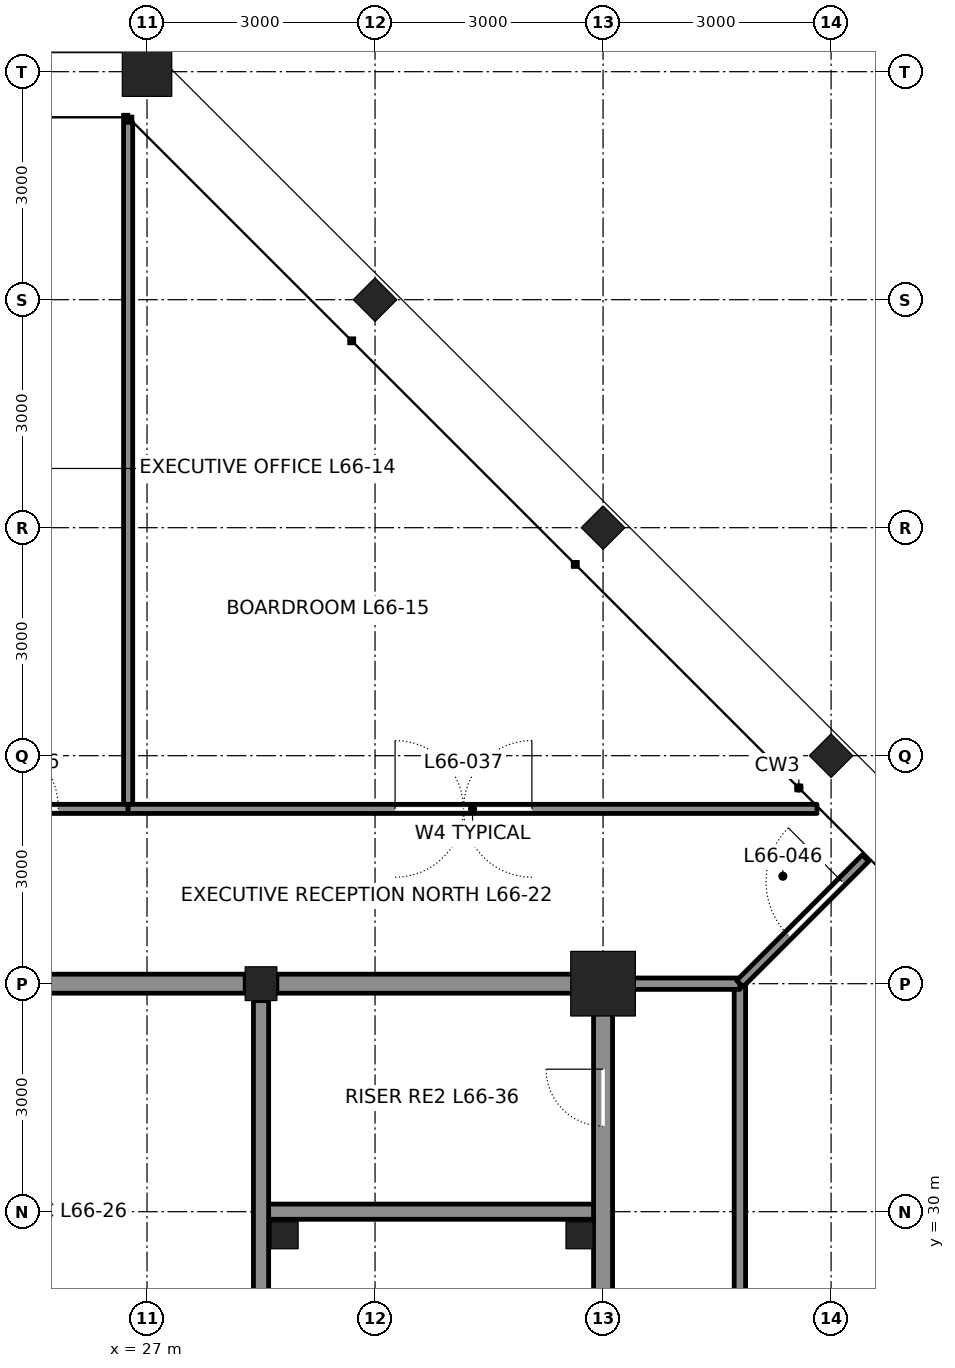
"""IFC4 building model, lengths in metres.
Left out: names, types, materials, properties, quantities, classifications, styles, units other than length and angle.
Written with IfcOpenShell. Run it as: python <this file> out.ifc"""

import sys

from ifc_helpers import new_model, si_unit, direction, frame, frame_2d, origin, origin_2d, place, context, subcontext, project, spatial, rectangle, hollow_rectangle, i_section, extrude, element, fill, save


model = new_model("IFC4")
c1 = context("Model", 3, precision=1e-05, world=origin(), true_north=direction((0.0, 1.0)))
c2 = subcontext(c1, "Body", "Model", "MODEL_VIEW")
j1 = project(units=[si_unit("LENGTHUNIT", "METRE"), si_unit("PLANEANGLEUNIT", "RADIAN")], contexts=[c1])
p1 = place(None, origin())
s1 = spatial("IfcSite", under=j1, at=p1, CompositionType="ELEMENT")
p2 = place(p1, origin())
s2 = spatial("IfcBuilding", under=s1, at=p2, CompositionType="ELEMENT")
p3 = place(p2, frame((0.0, 0.0, 295.8)))
s3 = spatial("IfcBuildingStorey", under=s2, at=p3, CompositionType="ELEMENT", Elevation=295.8)
for number, where, z_axis, x_axis in (
    (1, (36.0, 36.0, 0.0), (0.0, 0.0, 1.0), (0.707, 0.707, 0.0)),
    (2, (33.0, 39.0, 0.0), (0.0, 0.0, 1.0), (0.707, 0.707, 0.0)),
    (3, (30.0, 42.0, 0.0), (0.0, 0.0, 1.0), (0.707, 0.707, 0.0)),
):
    element("IfcColumn", number, at=place(p3, frame(where, z_axis=z_axis, x_axis=x_axis)), inside=s3, PredefinedType="COLUMN", context=c2, shape_type="SweptSolid", body=[
        extrude(i_section(OverallWidth=0.404, OverallDepth=0.406, WebThickness=0.027, FlangeThickness=0.044, at=origin_2d()), origin(), (0.0, 0.0, 1.0), 4.2),
    ])
p4 = place(p3, frame((27.0, 45.0, 0.0), z_axis=(0.0, 0.0, 1.0), x_axis=(0.0, 1.0, 0.0)))
e4 = element("IfcColumn", 4, at=p4, inside=s3, PredefinedType="COLUMN", context=c2, shape_type="SweptSolid", body=[
    extrude(hollow_rectangle(XDim=0.65, YDim=0.65, WallThickness=0.065, at=origin_2d()), origin(), (0.0, 0.0, 1.0), 4.2),
])
p5 = place(p3, frame((28.5, 33.0, 0.0), z_axis=(0.0, 0.0, 1.0), x_axis=(1.0, 0.0, 0.0)))
e5 = element("IfcColumn", 5, at=p5, inside=s3, PredefinedType="COLUMN", context=c2, shape_type="SweptSolid", body=[
    extrude(i_section(OverallWidth=0.417, OverallDepth=0.445, WebThickness=0.039, FlangeThickness=0.063, at=origin_2d()), origin(), (0.0, 0.0, 1.0), 4.2),
])
p6 = place(p3, frame((33.0, 33.0, 0.0), z_axis=(0.0, 0.0, 1.0), x_axis=(1.0, 0.0, 0.0)))
e6 = element("IfcColumn", 6, at=p6, inside=s3, PredefinedType="COLUMN", context=c2, shape_type="SweptSolid", body=[
    extrude(hollow_rectangle(XDim=0.85, YDim=0.85, WallThickness=0.085, at=origin_2d()), origin(), (0.0, 0.0, 1.0), 4.2),
])
p7 = place(p3, frame((28.5, 30.0, 0.0), z_axis=(0.0, 0.0, 1.0), x_axis=(1.0, 0.0, 0.0)))
e7 = element("IfcWall", 7, at=p7, inside=s3, PredefinedType="SOLIDWALL", context=c2, shape_type="SweptSolid", body=[
    extrude(rectangle(XDim=4.5, YDim=0.2, at=frame_2d((2.25, 0.0))), origin(), (0.0, 0.0, 1.0), 4.04),
])
p8 = place(p3, frame((25.708, 33.0, 0.0), z_axis=(0.0, 0.0, 1.0), x_axis=(1.0, 0.0, 0.0)))
e8 = element("IfcWall", 8, at=p8, inside=s3, PredefinedType="SOLIDWALL", context=c2, shape_type="SweptSolid", body=[
    extrude(rectangle(XDim=2.583, YDim=0.25, at=frame_2d((1.292, 0.0))), origin(), (0.0, 0.0, 1.0), 3.181),
])
p9 = place(p3, frame((28.708, 33.0, 0.0), z_axis=(0.0, 0.0, 1.0), x_axis=(1.0, 0.0, 0.0)))
e9 = element("IfcWall", 9, at=p9, inside=s3, PredefinedType="SOLIDWALL", context=c2, shape_type="SweptSolid", body=[
    extrude(rectangle(XDim=4.042, YDim=0.25, at=frame_2d((2.021, 0.0))), origin(), (0.0, 0.0, 1.0), 3.181),
])
p10 = place(p3, frame((28.5, 24.222, 0.0), z_axis=(0.0, 0.0, 1.0), x_axis=(0.0, 1.0, 0.0)))
e10 = element("IfcWall", 10, at=p10, inside=s3, PredefinedType="SOLIDWALL", context=c2, shape_type="SweptSolid", body=[
    extrude(rectangle(XDim=8.555, YDim=0.2, at=frame_2d((4.278, 0.0))), origin(), (0.0, 0.0, 1.0), 3.113),
])
p11 = place(p3, frame((33.0, 24.222, 0.0), z_axis=(0.0, 0.0, 1.0), x_axis=(0.0, 1.0, 0.0)))
e11 = element("IfcWall", 11, at=p11, inside=s3, PredefinedType="SOLIDWALL", context=c2, shape_type="SweptSolid", body=[
    extrude(rectangle(XDim=8.528, YDim=0.25, at=frame_2d((4.264, 0.0))), origin(), (0.0, 0.0, 1.0), 3.113),
])
p12 = place(p11, frame((6.903, 0.0, 0.0)))
e12 = element("IfcOpeningElement", 12, at=p12, cuts=e11, PredefinedType="OPENING", context=c2, shape_type="SweptSolid", body=[
    extrude(rectangle(XDim=0.75, YDim=2.1, at=frame_2d((0.375, 1.05))), frame((0.0, 0.135, 0.0), z_axis=(0.0, -1.0, 0.0), x_axis=(1.0, 0.0, 0.0)), (0.0, 0.0, 1.0), 0.27),
])
p13 = place(p3, frame((26.751, 44.334, 0.0), z_axis=(0.0, 0.0, 1.0), x_axis=(0.0, -1.0, 0.0)))
e13 = element("IfcWall", 13, at=p13, inside=s3, PredefinedType="PARTITIONING", context=c2, shape_type="SweptSolid", body=[
    extrude(rectangle(XDim=9.034, YDim=0.12, at=frame_2d((4.517, 0.0))), origin(), (0.0, 0.0, 1.0), 4.04),
])
p14 = place(p3, frame((23.917, 35.3, 0.0), z_axis=(0.0, 0.0, 1.0), x_axis=(1.0, 0.0, 0.0)))
e14 = element("IfcWall", 14, at=p14, inside=s3, PredefinedType="PARTITIONING", context=c2, shape_type="SweptSolid", body=[
    extrude(rectangle(XDim=2.834, YDim=0.12, at=frame_2d((1.417, 0.0))), origin(), (0.0, 0.0, 1.0), 4.04),
])
p15 = place(p14, frame((0.917, 0.0, 0.0)))
e15 = element("IfcOpeningElement", 15, at=p15, cuts=e14, PredefinedType="OPENING", context=c2, shape_type="SweptSolid", body=[
    extrude(rectangle(XDim=1.0, YDim=2.4, at=frame_2d((0.5, 1.2))), frame((0.0, 0.07, 0.0), z_axis=(0.0, -1.0, 0.0), x_axis=(1.0, 0.0, 0.0)), (0.0, 0.0, 1.0), 0.14),
])
p16 = place(p3, frame((26.751, 35.3, 0.0), z_axis=(0.0, 0.0, 1.0), x_axis=(1.0, 0.0, 0.0)))
e16 = element("IfcWall", 16, at=p16, inside=s3, PredefinedType="PARTITIONING", context=c2, shape_type="SweptSolid", body=[
    extrude(rectangle(XDim=9.063, YDim=0.12, at=frame_2d((4.531, 0.0))), origin(), (0.0, 0.0, 1.0), 4.04),
])
p17 = place(p16, frame((3.512, 0.0, 0.0)))
e17 = element("IfcOpeningElement", 17, at=p17, cuts=e16, PredefinedType="OPENING", context=c2, shape_type="SweptSolid", body=[
    extrude(rectangle(XDim=1.8, YDim=2.4, at=frame_2d((0.9, 1.2))), frame((0.0, 0.07, 0.0), z_axis=(0.0, -1.0, 0.0), x_axis=(1.0, 0.0, 0.0)), (0.0, 0.0, 1.0), 0.14),
])
p18 = place(p3, frame((34.8, 8.686, 0.0), z_axis=(0.0, 0.0, 1.0), x_axis=(0.0, 1.0, 0.0)))
e18 = element("IfcWall", 18, at=p18, inside=s3, PredefinedType="PARTITIONING", context=c2, shape_type="SweptSolid", body=[
    extrude(rectangle(XDim=24.314, YDim=0.15, at=frame_2d((12.157, 0.0))), origin(), (0.0, 0.0, 1.0), 4.04),
])
p19 = place(p18, frame((11.5, 0.0, 0.0)))
e19 = element("IfcOpeningElement", 19, at=p19, cuts=e18, PredefinedType="OPENING", context=c2, shape_type="SweptSolid", body=[
    extrude(rectangle(XDim=1.0, YDim=2.4, at=frame_2d((0.5, 1.2))), frame((0.0, 0.085, 0.0), z_axis=(0.0, -1.0, 0.0), x_axis=(1.0, 0.0, 0.0)), (0.0, 0.0, 1.0), 0.17),
])
p20 = place(p3, frame((33.0, 33.0, 0.0), z_axis=(0.0, 0.0, 1.0), x_axis=(1.0, 0.0, 0.0)))
e20 = element("IfcWall", 20, at=p20, inside=s3, PredefinedType="PARTITIONING", context=c2, shape_type="SweptSolid", body=[
    extrude(rectangle(XDim=1.8, YDim=0.15, at=frame_2d((0.9, 0.0))), origin(), (0.0, 0.0, 1.0), 3.093),
])
p21 = place(p3, frame((34.8, 33.0, 0.0), z_axis=(0.0, 0.0, 1.0), x_axis=(0.707106781187, 0.707106781187, 0.0)))
e21 = element("IfcWall", 21, at=p21, inside=s3, PredefinedType="PARTITIONING", context=c2, shape_type="SweptSolid", body=[
    extrude(rectangle(XDim=2.338, YDim=0.12, at=frame_2d((1.169, 0.0))), origin(), (0.0, 0.0, 1.0), 4.04),
])
p22 = place(p21, frame((0.9, 0.0, 0.0)))
e22 = element("IfcOpeningElement", 22, at=p22, cuts=e21, PredefinedType="OPENING", context=c2, shape_type="SweptSolid", body=[
    extrude(rectangle(XDim=1.0, YDim=2.4, at=frame_2d((0.5, 1.2))), frame((0.0, 0.07, 0.0), z_axis=(0.0, -1.0, 0.0), x_axis=(1.0, 0.0, 0.0)), (0.0, 0.0, 1.0), 0.14),
])
for number, where, z_axis, x_axis in (
    (23, (28.81, 29.69, 0.0), (0.0, 0.0, 1.0), (1.0, 0.0, 0.0)),
    (24, (32.69, 29.69, 0.0), (0.0, 0.0, 1.0), (1.0, 0.0, 0.0)),
):
    element("IfcColumn", number, at=place(p3, frame(where, z_axis=z_axis, x_axis=x_axis)), inside=s3, PredefinedType="COLUMN", context=c2, shape_type="SweptSolid", body=[
        extrude(hollow_rectangle(XDim=0.356, YDim=0.356, WallThickness=0.009, at=origin_2d()), origin(), (0.0, 0.0, 1.0), 4.2),
    ])
p23 = place(p12, origin())
e25 = element("IfcDoor", 25, at=p23, inside=s3, OperationType="SINGLE_SWING_RIGHT", PredefinedType="DOOR", context=c2, shape_type="SweptSolid", body=[
    extrude(rectangle(XDim=0.75, YDim=2.1, at=frame_2d((0.375, 1.05))), frame((0.0, 0.025, 0.0), z_axis=(0.0, -1.0, 0.0), x_axis=(1.0, 0.0, 0.0)), (0.0, 0.0, 1.0), 0.05),
])
fill(e12, e25)
p24 = place(p15, origin())
e26 = element("IfcDoor", 26, at=p24, inside=s3, OperationType="SINGLE_SWING_LEFT", PredefinedType="DOOR", context=c2, shape_type="SweptSolid", body=[
    extrude(rectangle(XDim=1.0, YDim=2.4, at=frame_2d((0.5, 1.2))), frame((0.0, 0.025, 0.0), z_axis=(0.0, -1.0, 0.0), x_axis=(1.0, 0.0, 0.0)), (0.0, 0.0, 1.0), 0.05),
])
fill(e15, e26)
p25 = place(p17, origin())
e27 = element("IfcDoor", 27, at=p25, inside=s3, OperationType="DOUBLE_DOOR_DOUBLE_SWING", PredefinedType="DOOR", context=c2, shape_type="SweptSolid", body=[
    extrude(rectangle(XDim=1.8, YDim=2.4, at=frame_2d((0.9, 1.2))), frame((0.0, 0.025, 0.0), z_axis=(0.0, -1.0, 0.0), x_axis=(1.0, 0.0, 0.0)), (0.0, 0.0, 1.0), 0.05),
])
fill(e17, e27)
p26 = place(p22, origin())
e28 = element("IfcDoor", 28, at=p26, inside=s3, OperationType="SINGLE_SWING_RIGHT", PredefinedType="DOOR", context=c2, shape_type="SweptSolid", body=[
    extrude(rectangle(XDim=1.0, YDim=2.4, at=frame_2d((0.5, 1.2))), frame((0.0, 0.025, 0.0), z_axis=(0.0, -1.0, 0.0), x_axis=(1.0, 0.0, 0.0)), (0.0, 0.0, 1.0), 0.05),
])
fill(e22, e28)
save(model, sys.argv[1])
